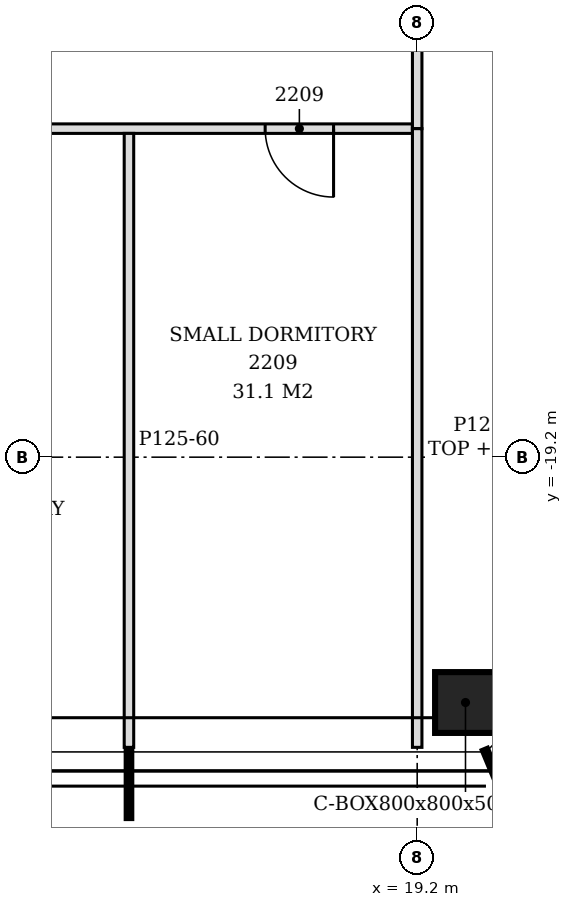
"""IFC4 building model, lengths in metres.
Left out: names, types, materials, properties, quantities, classifications, styles, units other than length and angle.
Written with IfcOpenShell. Run it as: python <this file> out.ifc"""

import sys

from ifc_helpers import new_model, si_unit, direction, frame, frame_2d, origin, origin_2d, place, context, subcontext, project, spatial, polyline, rectangle, hollow_rectangle, outline, extrude, clip, halfspace, element, fill, save


model = new_model("IFC4")
c1 = context("Model", 3, precision=1e-05, world=origin(), true_north=direction((0.0, 1.0)))
c2 = subcontext(c1, "Body", "Model", "MODEL_VIEW")
j1 = project(units=[si_unit("LENGTHUNIT", "METRE"), si_unit("PLANEANGLEUNIT", "RADIAN")], contexts=[c1])
p1 = place(None, origin())
s1 = spatial("IfcSite", under=j1, at=p1, CompositionType="ELEMENT")
p2 = place(p1, origin())
s2 = spatial("IfcBuilding", under=s1, at=p2, CompositionType="ELEMENT")
p3 = place(p2, frame((0.0, 0.0, 94.2)))
s3 = spatial("IfcBuildingStorey", under=s2, at=p3, CompositionType="ELEMENT", Elevation=94.2)
p4 = place(p3, frame((19.836, -22.428, -0.15), z_axis=(0.281903412306, 0.18797814682, 0.940847852975), x_axis=(-0.554787109556, 0.83199234556, 0.0)))
e1 = element("IfcColumn", 1, at=p4, inside=s3, PredefinedType="COLUMN", context=c2, shape_type="Clipping", body=[
    clip(clip(extrude(hollow_rectangle(XDim=0.8, YDim=0.8, WallThickness=0.05, at=origin_2d()), origin(), (0.0, 0.0, 1.0), 3.826), halfspace(frame((0.0, 0.0, 0.024), z_axis=(0.0, 0.0, 1.0), x_axis=(1.0, 0.0, 0.0)), True)), halfspace(frame((0.0, 0.0, 3.802), z_axis=(0.0, 0.0, 1.0), x_axis=(1.0, 0.0, 0.0)), False)),
])
p5 = place(p3, frame((15.408, -23.018, 0.0), z_axis=(0.0, 0.0, 1.0), x_axis=(0.0, 1.0, 0.0)))
e2 = element("IfcWall", 2, at=p5, inside=s3, PredefinedType="PARTITIONING", context=c2, shape_type="SweptSolid", body=[
    extrude(outline(polyline([(0.0, 0.0), (8.077, 0.0), (8.077, 3.45), (5.314, 3.45), (5.312, 2.88), (5.104, 2.88), (5.102, 3.45), (1.459, 3.45), (1.457, 2.93), (1.159, 2.93), (1.157, 3.45), (0.0, 3.45), (0.0, 0.0)])), frame((0.0, 0.062, 0.0), z_axis=(0.0, -1.0, 0.0), x_axis=(1.0, 0.0, 0.0)), (0.0, 0.0, 1.0), 0.125),
])
p6 = place(p3, frame((19.2, -23.018, 0.0), z_axis=(0.0, 0.0, 1.0), x_axis=(0.0, 1.0, 0.0)))
e3 = element("IfcWall", 3, at=p6, inside=s3, PredefinedType="PARTITIONING", context=c2, shape_type="SweptSolid", body=[
    extrude(rectangle(XDim=8.14, YDim=0.125, at=frame_2d((4.07, 0.0))), origin(), (0.0, 0.0, 1.0), 2.73),
])
p7 = place(p3, frame((-19.342, -14.878, 0.0), z_axis=(0.0, 0.0, 1.0), x_axis=(1.0, 0.0, 0.0)))
e4 = element("IfcWall", 4, at=p7, inside=s3, PredefinedType="PARTITIONING", context=c2, shape_type="SweptSolid", body=[
    extrude(outline(polyline([(0.0, 0.0), (38.479, 0.0), (38.479, 2.73), (38.392, 2.73), (38.39, 3.45), (26.692, 3.45), (26.69, 2.73), (26.392, 2.73), (26.39, 3.45), (14.692, 3.45), (14.69, 2.73), (14.392, 2.73), (14.39, 3.45), (5.092, 3.45), (5.09, 2.93), (4.792, 2.93), (4.79, 3.45), (0.0, 3.45), (0.0, 0.0)])), frame((0.0, 0.062, 0.0), z_axis=(0.0, -1.0, 0.0), x_axis=(1.0, 0.0, 0.0)), (0.0, 0.0, 1.0), 0.125),
])
p8 = place(p7, frame((0.863, 0.0, 0.0)))
e5 = element("IfcOpeningElement", 5, at=p8, cuts=e4, PredefinedType="OPENING", context=c2, shape_type="SweptSolid", body=[
    extrude(rectangle(XDim=0.9, YDim=2.1, at=frame_2d((0.45, 1.05))), frame((0.0, 0.073, 0.0), z_axis=(0.0, -1.0, 0.0), x_axis=(1.0, 0.0, 0.0)), (0.0, 0.0, 1.0), 0.145),
])
p9 = place(p7, frame((3.742, 0.0, 0.0)))
e6 = element("IfcOpeningElement", 6, at=p9, cuts=e4, PredefinedType="OPENING", context=c2, shape_type="SweptSolid", body=[
    extrude(rectangle(XDim=0.9, YDim=2.1, at=frame_2d((0.45, 1.05))), frame((0.0, 0.073, 0.0), z_axis=(0.0, -1.0, 0.0), x_axis=(1.0, 0.0, 0.0)), (0.0, 0.0, 1.0), 0.145),
])
p10 = place(p7, frame((7.876, 0.0, 0.0)))
e7 = element("IfcOpeningElement", 7, at=p10, cuts=e4, PredefinedType="OPENING", context=c2, shape_type="SweptSolid", body=[
    extrude(rectangle(XDim=0.9, YDim=2.1, at=frame_2d((0.45, 1.05))), frame((0.0, 0.073, 0.0), z_axis=(0.0, -1.0, 0.0), x_axis=(1.0, 0.0, 0.0)), (0.0, 0.0, 1.0), 0.145),
])
p11 = place(p7, frame((14.35, 0.0, 0.0)))
e8 = element("IfcOpeningElement", 8, at=p11, cuts=e4, PredefinedType="OPENING", context=c2, shape_type="SweptSolid", body=[
    extrude(rectangle(XDim=0.9, YDim=2.1, at=frame_2d((0.45, 1.05))), frame((0.0, 0.073, 0.0), z_axis=(0.0, -1.0, 0.0), x_axis=(1.0, 0.0, 0.0)), (0.0, 0.0, 1.0), 0.145),
])
p12 = place(p7, frame((17.29, 0.0, 0.0)))
e9 = element("IfcOpeningElement", 9, at=p12, cuts=e4, PredefinedType="OPENING", context=c2, shape_type="SweptSolid", body=[
    extrude(rectangle(XDim=0.9, YDim=2.1, at=frame_2d((0.45, 1.05))), frame((0.0, 0.073, 0.0), z_axis=(0.0, -1.0, 0.0), x_axis=(1.0, 0.0, 0.0)), (0.0, 0.0, 1.0), 0.145),
])
p13 = place(p7, frame((23.95, 0.0, 0.0)))
e10 = element("IfcOpeningElement", 10, at=p13, cuts=e4, PredefinedType="OPENING", context=c2, shape_type="SweptSolid", body=[
    extrude(rectangle(XDim=0.9, YDim=2.1, at=frame_2d((0.45, 1.05))), frame((0.0, 0.073, 0.0), z_axis=(0.0, -1.0, 0.0), x_axis=(1.0, 0.0, 0.0)), (0.0, 0.0, 1.0), 0.145),
])
p14 = place(p7, frame((26.703, 0.0, 0.0)))
e11 = element("IfcOpeningElement", 11, at=p14, cuts=e4, PredefinedType="OPENING", context=c2, shape_type="SweptSolid", body=[
    extrude(rectangle(XDim=0.9, YDim=2.1, at=frame_2d((0.45, 1.05))), frame((0.0, 0.073, 0.0), z_axis=(0.0, -1.0, 0.0), x_axis=(1.0, 0.0, 0.0)), (0.0, 0.0, 1.0), 0.145),
])
p15 = place(p7, frame((30.65, 0.0, 0.0)))
e12 = element("IfcOpeningElement", 12, at=p15, cuts=e4, PredefinedType="OPENING", context=c2, shape_type="SweptSolid", body=[
    extrude(rectangle(XDim=0.9, YDim=2.1, at=frame_2d((0.45, 1.05))), frame((0.0, 0.073, 0.0), z_axis=(0.0, -1.0, 0.0), x_axis=(1.0, 0.0, 0.0)), (0.0, 0.0, 1.0), 0.145),
])
p16 = place(p7, frame((36.542, 0.0, 0.0)))
e13 = element("IfcOpeningElement", 13, at=p16, cuts=e4, PredefinedType="OPENING", context=c2, shape_type="SweptSolid", body=[
    extrude(rectangle(XDim=0.9, YDim=2.1, at=frame_2d((0.45, 1.05))), frame((0.0, 0.073, 0.0), z_axis=(0.0, -1.0, 0.0), x_axis=(1.0, 0.0, 0.0)), (0.0, 0.0, 1.0), 0.145),
])
p17 = place(p3, frame((19.2, -14.878, 0.0), z_axis=(0.0, 0.0, 1.0), x_axis=(0.0, 1.0, 0.0)))
e14 = element("IfcWall", 14, at=p17, inside=s3, PredefinedType="PARTITIONING", context=c2, shape_type="SweptSolid", body=[
    extrude(rectangle(XDim=6.265, YDim=0.125, at=frame_2d((3.133, 0.0))), origin(), (0.0, 0.0, 1.0), 2.73),
])
p18 = place(p17, frame((4.55, 0.0, 0.0)))
e15 = element("IfcOpeningElement", 15, at=p18, cuts=e14, PredefinedType="OPENING", context=c2, shape_type="SweptSolid", body=[
    extrude(rectangle(XDim=0.9, YDim=2.1, at=frame_2d((0.45, 1.05))), frame((0.0, 0.073, 0.0), z_axis=(0.0, -1.0, 0.0), x_axis=(1.0, 0.0, 0.0)), (0.0, 0.0, 1.0), 0.145),
])
p19 = place(p16, frame((0.9, 0.0, 0.0), z_axis=(0.0, 0.0, 1.0), x_axis=(-1.0, 0.0, 0.0)))
e16 = element("IfcDoor", 16, at=p19, inside=s3, OperationType="SINGLE_SWING_LEFT", PredefinedType="DOOR", context=c2, shape_type="SweptSolid", body=[
    extrude(rectangle(XDim=0.9, YDim=2.1, at=frame_2d((0.45, 1.05))), frame((0.0, 0.025, 0.0), z_axis=(0.0, -1.0, 0.0), x_axis=(1.0, 0.0, 0.0)), (0.0, 0.0, 1.0), 0.05),
])
fill(e13, e16)
save(model, sys.argv[1])
